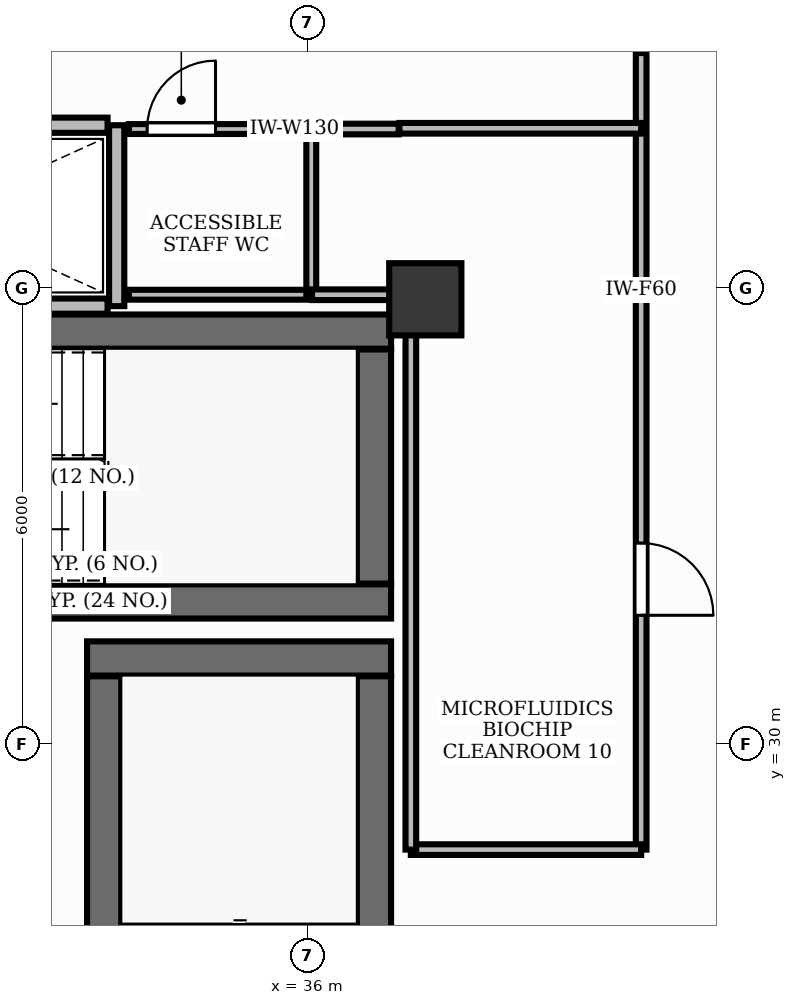
"""IFC4 building model, lengths in metres.
Left out: names, types, materials, properties, quantities, classifications, styles, units other than length and angle.
Written with IfcOpenShell. Run it as: python <this file> out.ifc"""

import sys

from ifc_helpers import new_model, si_unit, direction, frame, frame_2d, origin, origin_2d, place, context, subcontext, project, spatial, rectangle, extrude, element, fill, save


model = new_model("IFC4")
c1 = context("Model", 3, precision=1e-05, world=origin(), true_north=direction((0.0, 1.0)))
c2 = subcontext(c1, "Body", "Model", "MODEL_VIEW")
j1 = project(units=[si_unit("LENGTHUNIT", "METRE"), si_unit("PLANEANGLEUNIT", "RADIAN")], contexts=[c1])
p1 = place(None, origin())
s1 = spatial("IfcSite", under=j1, at=p1, CompositionType="ELEMENT")
p2 = place(p1, origin())
s2 = spatial("IfcBuilding", under=s1, at=p2, CompositionType="ELEMENT")
p3 = place(p2, frame((0.0, 0.0, 34.2)))
s3 = spatial("IfcBuildingStorey", under=s2, at=p3, CompositionType="ELEMENT", Elevation=34.2)
p4 = place(p3, frame((28.852, 35.425, 0.0), z_axis=(0.0, 0.0, 1.0), x_axis=(1.0, 0.0, 0.0)))
e1 = element("IfcWall", 1, at=p4, inside=s3, PredefinedType="SHEAR", context=c2, shape_type="SweptSolid", body=[
    extrude(rectangle(XDim=8.248, YDim=0.45, at=frame_2d((4.124, 0.0))), origin(), (0.0, 0.0, 1.0), 3.9),
])
p5 = place(p3, frame((28.35, 31.875, 0.0), z_axis=(0.0, 0.0, 1.0), x_axis=(1.0, 0.0, 0.0)))
e2 = element("IfcWall", 2, at=p5, inside=s3, PredefinedType="SHEAR", context=c2, shape_type="SweptSolid", body=[
    extrude(rectangle(XDim=8.75, YDim=0.45, at=frame_2d((4.375, 0.0))), origin(), (0.0, 0.0, 1.0), 3.9),
])
p6 = place(p3, frame((36.875, 32.11, 0.0), z_axis=(0.0, 0.0, 1.0), x_axis=(0.0, 1.0, 0.0)))
e3 = element("IfcWall", 3, at=p6, inside=s3, PredefinedType="SHEAR", context=c2, shape_type="SweptSolid", body=[
    extrude(rectangle(XDim=3.08, YDim=0.45, at=frame_2d((1.54, 0.0))), origin(), (0.0, 0.0, 1.0), 3.9),
])
p7 = place(p3, frame((33.1, 31.125, 0.0), z_axis=(0.0, 0.0, 1.0), x_axis=(1.0, 0.0, 0.0)))
e4 = element("IfcWall", 4, at=p7, inside=s3, PredefinedType="SHEAR", context=c2, shape_type="SweptSolid", body=[
    extrude(rectangle(XDim=4.0, YDim=0.45, at=frame_2d((2.0, 0.0))), origin(), (0.0, 0.0, 1.0), 3.9),
])
p8 = place(p3, frame((36.875, 23.11, 0.0), z_axis=(0.0, 0.0, 1.0), x_axis=(0.0, 1.0, 0.0)))
e5 = element("IfcWall", 5, at=p8, inside=s3, PredefinedType="SHEAR", context=c2, shape_type="SweptSolid", body=[
    extrude(rectangle(XDim=7.78, YDim=0.45, at=frame_2d((3.89, 0.0))), origin(), (0.0, 0.0, 1.0), 3.9),
])
p9 = place(p3, frame((33.325, 23.11, 0.0), z_axis=(0.0, 0.0, 1.0), x_axis=(0.0, 1.0, 0.0)))
e6 = element("IfcWall", 6, at=p9, inside=s3, PredefinedType="SHEAR", context=c2, shape_type="SweptSolid", body=[
    extrude(rectangle(XDim=7.78, YDim=0.45, at=frame_2d((3.89, 0.0))), origin(), (0.0, 0.0, 1.0), 3.9),
])
p10 = place(p9, frame((0.2, 0.0, 0.0)))
e7 = element("IfcOpeningElement", 7, at=p10, cuts=e6, PredefinedType="OPENING", context=c2, shape_type="SweptSolid", body=[
    extrude(rectangle(XDim=1.05, YDim=2.15, at=frame_2d((0.525, 1.075))), frame((0.0, 0.24, 0.0), z_axis=(0.0, -1.0, 0.0), x_axis=(1.0, 0.0, 0.0)), (0.0, 0.0, 1.0), 0.48),
])
p11 = place(p3, frame((37.55, 35.85, -0.0), z_axis=(0.0, 0.0, 1.0), x_axis=(1.0, 0.0, 0.0)))
e8 = element("IfcColumn", 8, at=p11, inside=s3, PredefinedType="PILASTER", context=c2, shape_type="SweptSolid", body=[
    extrude(rectangle(XDim=0.95, YDim=0.95, at=origin_2d()), origin(), (0.0, 0.0, 1.0), 3.901),
])
p12 = place(p3, frame((33.49, 35.76, 0.0), z_axis=(0.0, 0.0, 1.0), x_axis=(0.0, 1.0, 0.0)))
e9 = element("IfcWall", 9, at=p12, inside=s3, PredefinedType="PARTITIONING", context=c2, shape_type="SweptSolid", body=[
    extrude(rectangle(XDim=2.38, YDim=0.2, at=frame_2d((1.19, 0.0))), origin(), (0.0, 0.0, 1.0), 2.91),
])
for number, where, z_axis, x_axis in (
    (10, (28.8, 35.76, 0.0), (0.0, 0.0, 1.0), (1.0, 0.0, 0.0)),
    (11, (28.8, 38.14, 0.0), (0.0, 0.0, 1.0), (1.0, 0.0, 0.0)),
):
    element("IfcWall", number, at=place(p3, frame(where, z_axis=z_axis, x_axis=x_axis)), inside=s3, PredefinedType="PARTITIONING", context=c2, shape_type="SweptSolid", body=[
        extrude(rectangle(XDim=4.57, YDim=0.2, at=frame_2d((2.285, 0.0))), origin(), (0.0, 0.0, 1.0), 2.91),
    ])
p13 = place(p3, frame((33.65, 38.09, 0.0), z_axis=(0.0, 0.0, 1.0), x_axis=(1.0, 0.0, 0.0)))
e12 = element("IfcWall", 12, at=p13, inside=s3, PredefinedType="PARTITIONING", context=c2, shape_type="SweptSolid", body=[
    extrude(rectangle(XDim=2.4, YDim=0.13, at=frame_2d((1.2, 0.0))), origin(), (0.0, 0.0, 1.0), 2.91),
])
p14 = place(p13, frame((0.24, 0.0, 0.0)))
e13 = element("IfcOpeningElement", 13, at=p14, cuts=e12, PredefinedType="OPENING", context=c2, shape_type="SweptSolid", body=[
    extrude(rectangle(XDim=0.9, YDim=2.15, at=frame_2d((0.45, 1.075))), frame((0.0, 0.08, 0.0), z_axis=(0.0, -1.0, 0.0), x_axis=(1.0, 0.0, 0.0)), (0.0, 0.0, 1.0), 0.16),
])
p15 = place(p3, frame((40.39, 39.09, 0.0), z_axis=(0.0, 0.0, 1.0), x_axis=(0.0, -1.0, 0.0)))
e14 = element("IfcWall", 14, at=p15, inside=s3, PredefinedType="PARTITIONING", context=c2, shape_type="SweptSolid", body=[
    extrude(rectangle(XDim=10.48, YDim=0.14, at=frame_2d((5.24, 0.0))), origin(), (0.0, 0.0, 1.0), 2.91),
])
p16 = place(p15, frame((6.447, 0.0, 0.0)))
e15 = element("IfcOpeningElement", 15, at=p16, cuts=e14, PredefinedType="OPENING", context=c2, shape_type="SweptSolid", body=[
    extrude(rectangle(XDim=0.95, YDim=2.15, at=frame_2d((0.475, 1.075))), frame((0.0, 0.085, 0.0), z_axis=(0.0, -1.0, 0.0), x_axis=(1.0, 0.0, 0.0)), (0.0, 0.0, 1.0), 0.17),
])
p17 = place(p3, frame((36.05, 35.91, 0.0), z_axis=(0.0, 0.0, 1.0), x_axis=(-1.0, 0.0, 0.0)))
e16 = element("IfcWall", 16, at=p17, inside=s3, PredefinedType="PARTITIONING", context=c2, shape_type="SweptSolid", body=[
    extrude(rectangle(XDim=2.4, YDim=0.13, at=frame_2d((1.2, 0.0))), origin(), (0.0, 0.0, 1.0), 2.91),
])
p18 = place(p3, frame((36.05, 38.09, 0.0), z_axis=(0.0, 0.0, 1.0), x_axis=(0.0, -1.0, 0.0)))
e17 = element("IfcWall", 17, at=p18, inside=s3, PredefinedType="PARTITIONING", context=c2, shape_type="SweptSolid", body=[
    extrude(rectangle(XDim=2.18, YDim=0.13, at=frame_2d((1.09, 0.0))), origin(), (0.0, 0.0, 1.0), 2.91),
])
p19 = place(p3, frame((36.06, 38.09, 0.0), z_axis=(0.0, 0.0, 1.0), x_axis=(1.0, 0.0, 0.0)))
e18 = element("IfcWall", 18, at=p19, inside=s3, PredefinedType="PARTITIONING", context=c2, shape_type="SweptSolid", body=[
    extrude(rectangle(XDim=1.14, YDim=0.14, at=frame_2d((0.57, 0.0))), origin(), (0.0, 0.0, 1.0), 2.91),
])
p20 = place(p3, frame((37.21, 38.1, 0.0), z_axis=(0.0, 0.0, 1.0), x_axis=(1.0, 0.0, 0.0)))
e19 = element("IfcWall", 19, at=p20, inside=s3, PredefinedType="PARTITIONING", context=c2, shape_type="SweptSolid", body=[
    extrude(rectangle(XDim=3.18, YDim=0.14, at=frame_2d((1.59, 0.0))), origin(), (0.0, 0.0, 1.0), 2.91),
])
p21 = place(p3, frame((40.39, 28.61, 0.0), z_axis=(0.0, 0.0, 1.0), x_axis=(-1.0, 0.0, 0.0)))
e20 = element("IfcWall", 20, at=p21, inside=s3, PredefinedType="PARTITIONING", context=c2, shape_type="SweptSolid", body=[
    extrude(rectangle(XDim=3.03, YDim=0.14, at=frame_2d((1.515, 0.0))), origin(), (0.0, 0.0, 1.0), 2.91),
])
p22 = place(p3, frame((37.36, 28.61, 0.0), z_axis=(0.0, 0.0, 1.0), x_axis=(0.0, 1.0, 0.0)))
e21 = element("IfcWall", 21, at=p22, inside=s3, PredefinedType="PARTITIONING", context=c2, shape_type="SweptSolid", body=[
    extrude(rectangle(XDim=7.29, YDim=0.14, at=frame_2d((3.645, 0.0))), origin(), (0.0, 0.0, 1.0), 2.91),
])
p23 = place(p3, frame((37.35, 35.91, 0.0), z_axis=(0.0, 0.0, 1.0), x_axis=(-1.0, 0.0, 0.0)))
e22 = element("IfcWall", 22, at=p23, inside=s3, PredefinedType="PARTITIONING", context=c2, shape_type="SweptSolid", body=[
    extrude(rectangle(XDim=1.29, YDim=0.14, at=frame_2d((0.645, 0.0))), origin(), (0.0, 0.0, 1.0), 2.91),
])
p24 = place(p14, origin())
e23 = element("IfcDoor", 23, at=p24, inside=s3, OperationType="SINGLE_SWING_RIGHT", PredefinedType="DOOR", context=c2, shape_type="SweptSolid", body=[
    extrude(rectangle(XDim=0.9, YDim=2.15, at=frame_2d((0.45, 1.075))), frame((0.0, 0.025, 0.0), z_axis=(0.0, -1.0, 0.0), x_axis=(1.0, 0.0, 0.0)), (0.0, 0.0, 1.0), 0.05),
])
fill(e13, e23)
p25 = place(p16, origin())
e24 = element("IfcDoor", 24, at=p25, inside=s3, OperationType="SINGLE_SWING_RIGHT", PredefinedType="DOOR", context=c2, shape_type="SweptSolid", body=[
    extrude(rectangle(XDim=0.95, YDim=2.15, at=frame_2d((0.475, 1.075))), frame((0.0, 0.025, 0.0), z_axis=(0.0, -1.0, 0.0), x_axis=(1.0, 0.0, 0.0)), (0.0, 0.0, 1.0), 0.05),
])
fill(e15, e24)
save(model, sys.argv[1])
